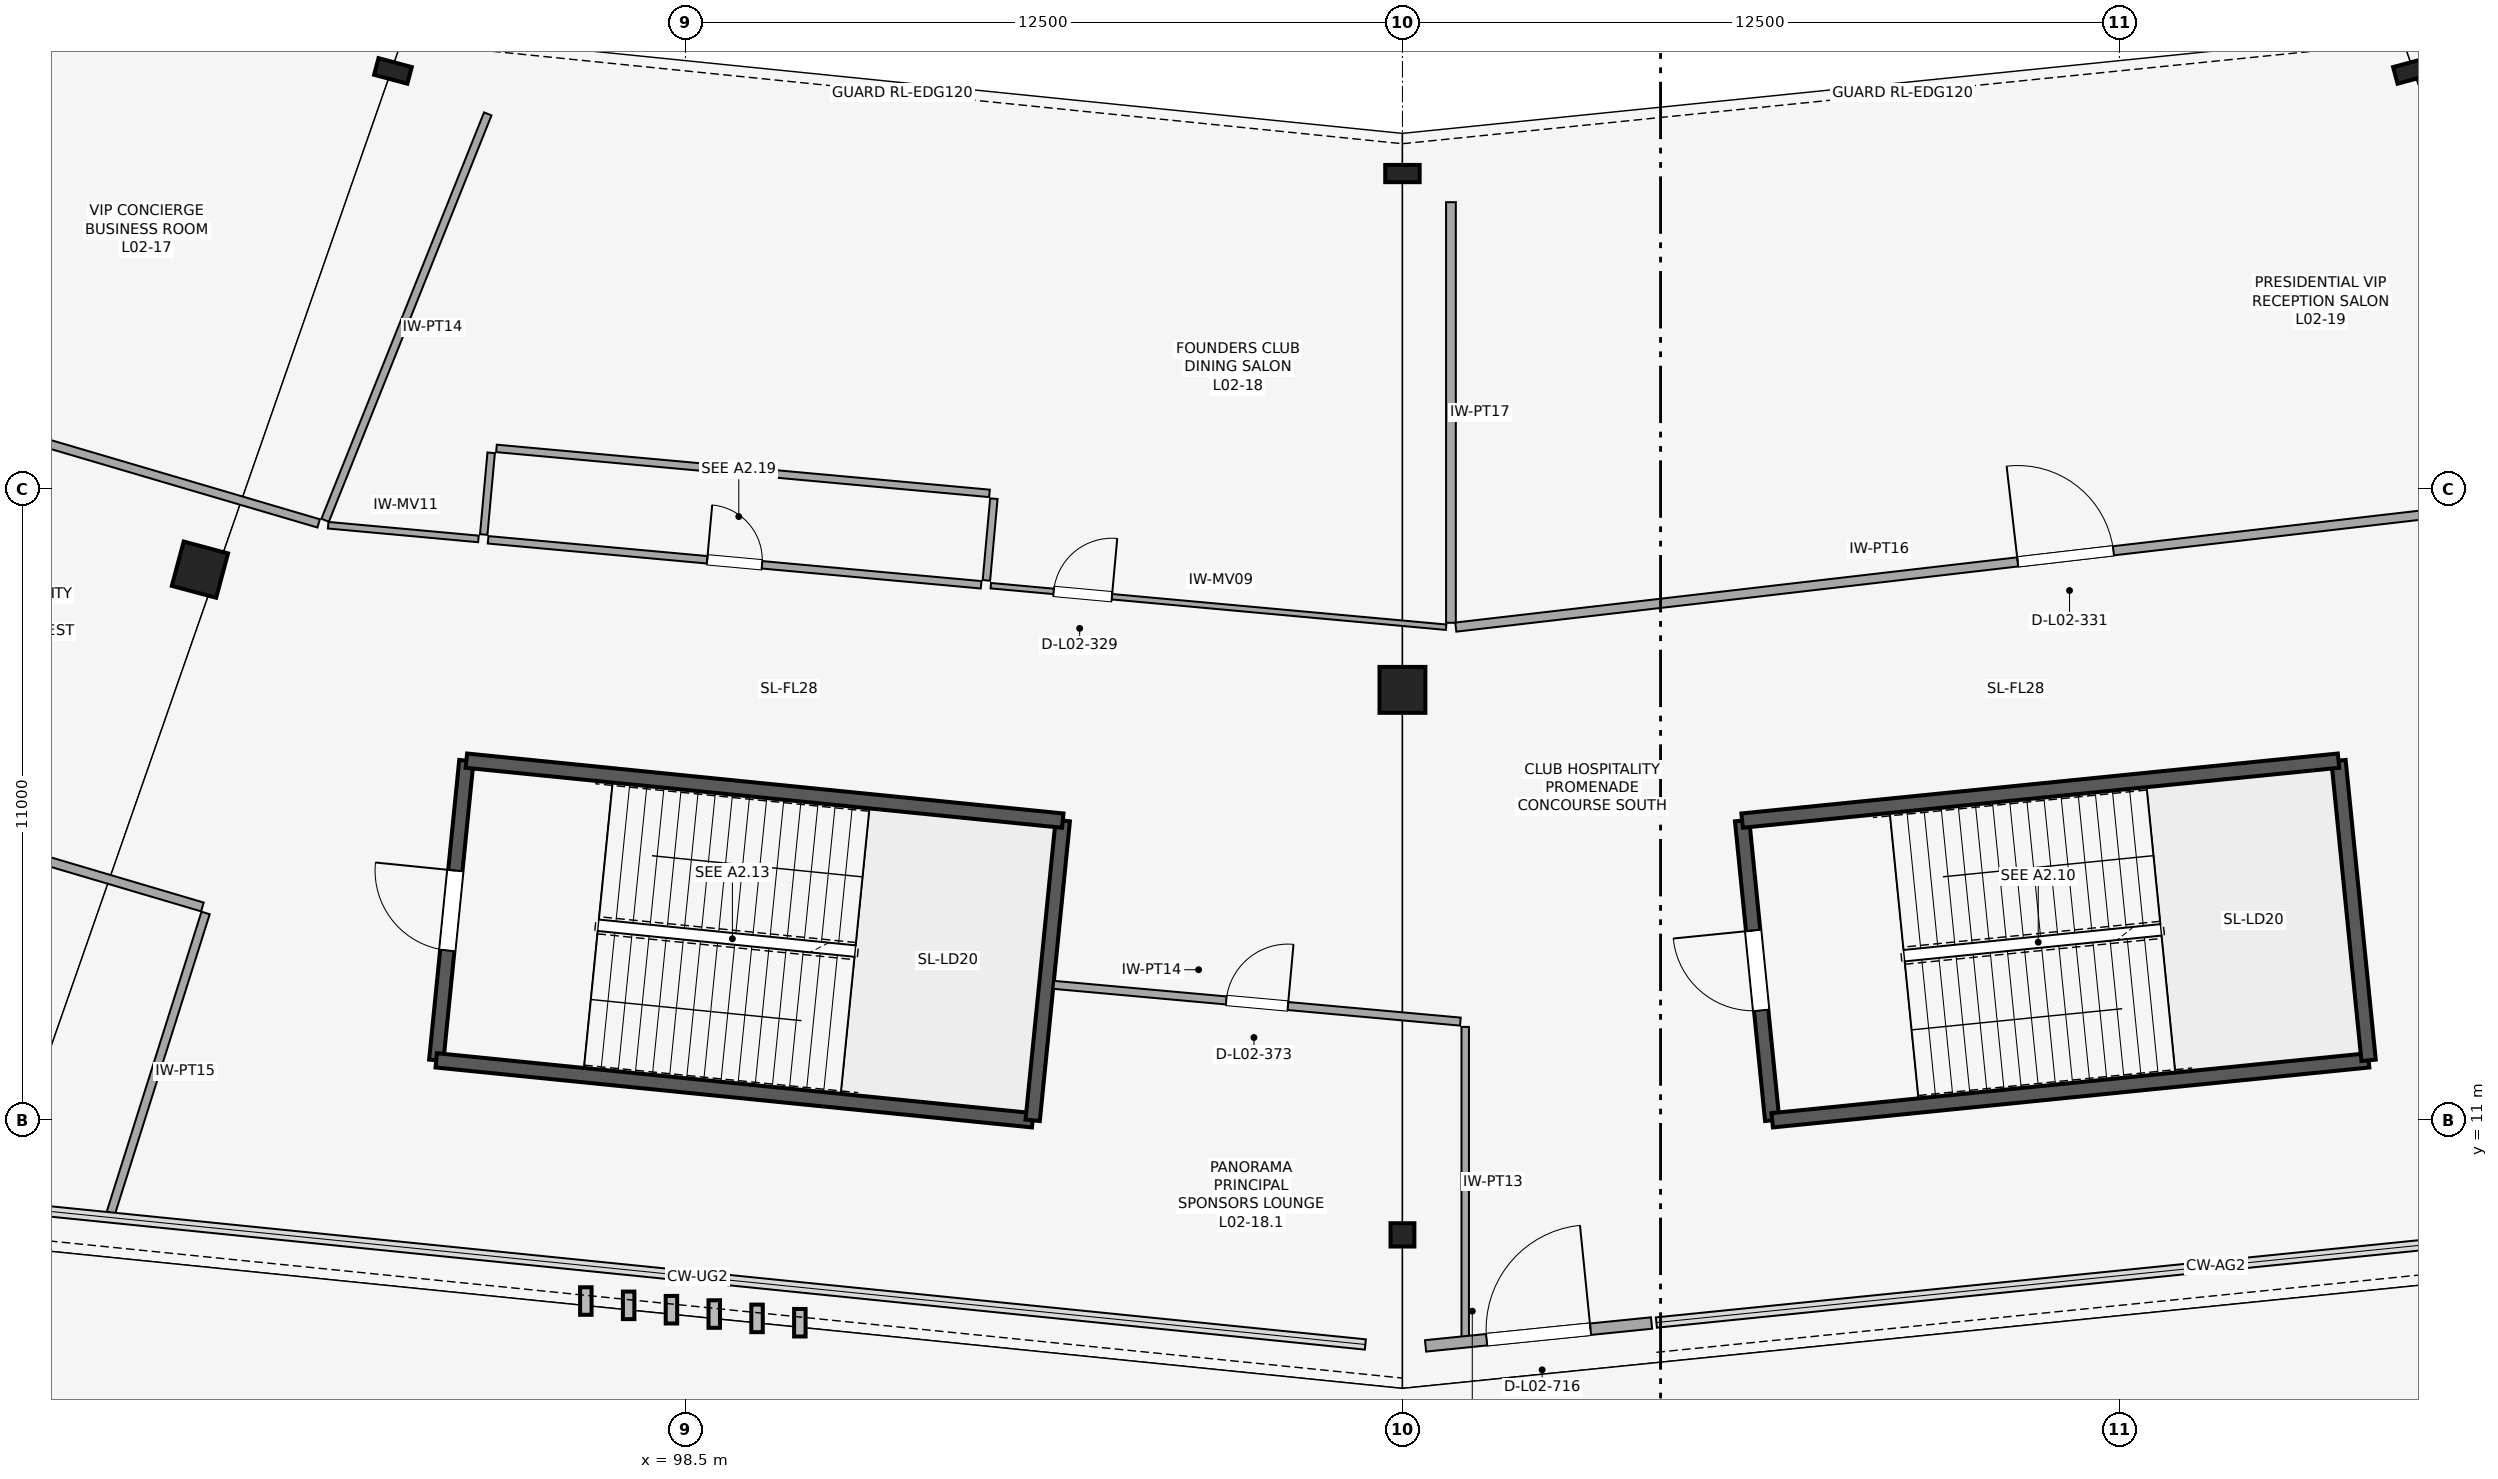
"""IFC4 building model, lengths in metres.
Left out: names, types, materials, properties, quantities, classifications, styles, units other than length and angle.
Written with IfcOpenShell. Run it as: python <this file> out.ifc"""

import sys

from ifc_helpers import new_model, si_unit, direction, frame, frame_2d, origin, origin_2d, place, context, subcontext, project, spatial, rectangle, i_section, extrude, element, fill, save


model = new_model("IFC4")
c1 = context("Model", 3, precision=1e-05, world=origin(), true_north=direction((0.0, 1.0)))
c2 = subcontext(c1, "Body", "Model", "MODEL_VIEW")
j1 = project(units=[si_unit("LENGTHUNIT", "METRE"), si_unit("PLANEANGLEUNIT", "RADIAN")], contexts=[c1])
p1 = place(None, origin())
s1 = spatial("IfcSite", under=j1, at=p1, CompositionType="ELEMENT")
p2 = place(p1, origin())
s2 = spatial("IfcBuilding", under=s1, at=p2, CompositionType="ELEMENT")
p3 = place(p2, frame((0.0, 0.0, 10.6)))
s3 = spatial("IfcBuildingStorey", under=s2, at=p3, CompositionType="ELEMENT", Elevation=10.6)
for number, where, z_axis, x_axis in (
    (1, (93.4, 29.289, 0.0), (0.0, 0.0, 1.0), (-0.259, -0.966, 0.0)),
    (2, (111.0, 27.5, 0.0), (0.0, 0.0, 1.0), (0.0, -1.0, 0.0)),
    (3, (128.6, 29.289, 0.0), (0.0, 0.0, 1.0), (0.259, -0.966, 0.0)),
):
    element("IfcColumn", number, at=place(p3, frame(where, z_axis=z_axis, x_axis=x_axis)), inside=s3, PredefinedType="COLUMN", context=c2, shape_type="SweptSolid", body=[
        extrude(i_section(OverallWidth=0.3, OverallDepth=0.6, WebThickness=0.015, FlangeThickness=0.03, FilletRadius=0.027, at=origin_2d()), origin(), (0.0, 0.0, 1.0), 5.0),
    ])
p4 = place(p3, frame((90.036, 20.596, 0.0), z_axis=(0.0, 0.0, 1.0), x_axis=(-0.258819045103, -0.965925826289, 0.0)))
e4 = element("IfcColumn", 4, at=p4, inside=s3, PredefinedType="COLUMN", context=c2, shape_type="SweptSolid", body=[
    extrude(rectangle(XDim=0.8, YDim=0.8, at=origin_2d()), origin(), (0.0, 0.0, 1.0), 5.0),
])
p5 = place(p3, frame((111.0, 18.5, -0.28), z_axis=(0.0, 0.0, 1.0), x_axis=(0.0, -1.0, 0.0)))
e5 = element("IfcColumn", 5, at=p5, inside=s3, PredefinedType="COLUMN", context=c2, shape_type="SweptSolid", body=[
    extrude(rectangle(XDim=0.8, YDim=0.8, at=origin_2d()), origin(), (0.0, 0.0, 1.0), 5.28),
])
p6 = place(p3, frame((111.0, 9.0, -0.28), z_axis=(0.0, 0.0, 1.0), x_axis=(0.0, -1.0, 0.0)))
e6 = element("IfcColumn", 6, at=p6, inside=s3, PredefinedType="PILASTER", context=c2, shape_type="SweptSolid", body=[
    extrude(i_section(OverallWidth=0.406, OverallDepth=0.416, WebThickness=0.024, FlangeThickness=0.039, FilletRadius=0.015, at=origin_2d()), origin(), (0.0, 0.0, 1.0), 5.28),
])
p7 = place(p3, frame((116.921, 16.221, 0.0), z_axis=(0.0, 0.0, 1.0), x_axis=(0.100028593886, -0.994984562898, 0.0)))
e7 = element("IfcWall", 7, at=p7, inside=s3, PredefinedType="SHEAR", context=c2, shape_type="SweptSolid", body=[
    extrude(rectangle(XDim=5.25, YDim=0.25, at=frame_2d((2.625, 0.0))), origin(), (0.0, 0.0, 1.0), 4.72),
])
p8 = place(p7, frame((1.925, 0.0, 0.0)))
e8 = element("IfcOpeningElement", 8, at=p8, cuts=e7, PredefinedType="OPENING", context=c2, shape_type="SweptSolid", body=[
    extrude(rectangle(XDim=1.4, YDim=2.2, at=frame_2d((0.7, 1.1))), frame((0.0, 0.135, 0.0), z_axis=(0.0, -1.0, 0.0), x_axis=(1.0, 0.0, 0.0)), (0.0, 0.0, 1.0), 0.27),
])
p9 = place(p3, frame((117.447, 10.997, 0.0), z_axis=(0.0, 0.0, 1.0), x_axis=(0.994985938948, 0.100014905366, 0.0)))
e9 = element("IfcWall", 9, at=p9, inside=s3, PredefinedType="SHEAR", context=c2, shape_type="SweptSolid", body=[
    extrude(rectangle(XDim=10.45, YDim=0.25, at=frame_2d((5.225, 0.0))), origin(), (0.0, 0.0, 1.0), 4.72),
])
p10 = place(p3, frame((127.844, 12.042, 0.0), z_axis=(0.0, 0.0, 1.0), x_axis=(-0.100028593886, 0.994984562898, 0.0)))
e10 = element("IfcWall", 10, at=p10, inside=s3, PredefinedType="SHEAR", context=c2, shape_type="SweptSolid", body=[
    extrude(rectangle(XDim=5.25, YDim=0.25, at=frame_2d((2.625, 0.0))), origin(), (0.0, 0.0, 1.0), 4.72),
])
p11 = place(p3, frame((127.319, 17.266, 0.0), z_axis=(0.0, 0.0, 1.0), x_axis=(-0.994985938948, -0.100014905366, 0.0)))
e11 = element("IfcWall", 11, at=p11, inside=s3, PredefinedType="SHEAR", context=c2, shape_type="SweptSolid", body=[
    extrude(rectangle(XDim=10.45, YDim=0.25, at=frame_2d((5.225, 0.0))), origin(), (0.0, 0.0, 1.0), 4.72),
])
p12 = place(p3, frame((94.681, 17.266, 0.0), z_axis=(0.0, 0.0, 1.0), x_axis=(-0.10002396577, -0.994985028165, 0.0)))
e12 = element("IfcWall", 12, at=p12, inside=s3, PredefinedType="SHEAR", context=c2, shape_type="SweptSolid", body=[
    extrude(rectangle(XDim=5.25, YDim=0.25, at=frame_2d((2.625, 0.0))), origin(), (0.0, 0.0, 1.0), 4.72),
])
p13 = place(p12, frame((1.925, 0.0, 0.0)))
e13 = element("IfcOpeningElement", 13, at=p13, cuts=e12, PredefinedType="OPENING", context=c2, shape_type="SweptSolid", body=[
    extrude(rectangle(XDim=1.4, YDim=2.2, at=frame_2d((0.7, 1.1))), frame((0.0, 0.135, 0.0), z_axis=(0.0, -1.0, 0.0), x_axis=(1.0, 0.0, 0.0)), (0.0, 0.0, 1.0), 0.27),
])
p14 = place(p3, frame((94.156, 12.042, 0.0), z_axis=(0.0, 0.0, 1.0), x_axis=(0.994988263568, -0.09999177647, 0.0)))
e14 = element("IfcWall", 14, at=p14, inside=s3, PredefinedType="SHEAR", context=c2, shape_type="SweptSolid", body=[
    extrude(rectangle(XDim=10.45, YDim=0.25, at=frame_2d((5.225, 0.0))), origin(), (0.0, 0.0, 1.0), 4.72),
])
p15 = place(p3, frame((104.553, 10.997, 0.0), z_axis=(0.0, 0.0, 1.0), x_axis=(0.099982555566, 0.994989190184, 0.0)))
e15 = element("IfcWall", 15, at=p15, inside=s3, PredefinedType="SHEAR", context=c2, shape_type="SweptSolid", body=[
    extrude(rectangle(XDim=5.25, YDim=0.25, at=frame_2d((2.625, 0.0))), origin(), (0.0, 0.0, 1.0), 4.72),
])
p16 = place(p3, frame((105.078, 16.221, 0.0), z_axis=(0.0, 0.0, 1.0), x_axis=(-0.994985705245, 0.100017230303, 0.0)))
e16 = element("IfcWall", 16, at=p16, inside=s3, PredefinedType="SHEAR", context=c2, shape_type="SweptSolid", body=[
    extrude(rectangle(XDim=10.45, YDim=0.25, at=frame_2d((5.225, 0.0))), origin(), (0.0, 0.0, 1.0), 4.72),
])
p17 = place(p3, frame((72.279, 27.237, 0.0), z_axis=(0.0, 0.0, 1.0), x_axis=(0.959319404283, -0.282323007504, 0.0)))
e17 = element("IfcWall", 17, at=p17, inside=s3, PredefinedType="PARTITIONING", context=c2, shape_type="SweptSolid", body=[
    extrude(rectangle(XDim=20.668, YDim=0.15, at=frame_2d((10.334, 0.0))), origin(), (0.0, 0.0, 1.0), 3.47),
])
p18 = place(p17, frame((9.494, 0.0, 0.0)))
e18 = element("IfcOpeningElement", 18, at=p18, cuts=e17, PredefinedType="OPENING", context=c2, shape_type="SweptSolid", body=[
    extrude(rectangle(XDim=1.68, YDim=2.1, at=frame_2d((0.84, 1.05))), frame((0.0, 0.085, 0.0), z_axis=(0.0, -1.0, 0.0), x_axis=(1.0, 0.0, 0.0)), (0.0, 0.0, 1.0), 0.17),
])
p19 = place(p3, frame((95.054, 28.54, 0.0), z_axis=(0.0, 0.0, 1.0), x_axis=(-0.37161687276, -0.928386180358, 0.0)))
e19 = element("IfcWall", 19, at=p19, inside=s3, PredefinedType="PARTITIONING", context=c2, shape_type="SweptSolid", body=[
    extrude(rectangle(XDim=7.629, YDim=0.14, at=frame_2d((3.815, 0.0))), origin(), (0.0, 0.0, 1.0), 3.47),
])
p20 = place(p3, frame((95.06, 21.116, 0.0), z_axis=(0.0, 0.0, 1.0), x_axis=(0.995863239806, -0.090864776475, 0.0)))
e20 = element("IfcWall", 20, at=p20, inside=s3, PredefinedType="PARTITIONING", context=c2, shape_type="SweptSolid", body=[
    extrude(rectangle(XDim=8.63, YDim=0.13, at=frame_2d((4.315, 0.0))), origin(), (0.0, 0.0, 1.0), 3.47),
])
p21 = place(p20, frame((3.835, 0.0, 0.0)))
e21 = element("IfcOpeningElement", 21, at=p21, cuts=e20, PredefinedType="OPENING", context=c2, shape_type="SweptSolid", body=[
    extrude(rectangle(XDim=0.96, YDim=2.24, at=frame_2d((0.48, 1.12))), frame((0.0, 0.075, 0.0), z_axis=(0.0, -1.0, 0.0), x_axis=(1.0, 0.0, 0.0)), (0.0, 0.0, 1.0), 0.15),
])
p22 = place(p3, frame((95.206, 22.709, 0.0), z_axis=(0.0, 0.0, 1.0), x_axis=(0.995865565838, -0.090839279925, 0.0)))
e22 = element("IfcWall", 22, at=p22, inside=s3, PredefinedType="PARTITIONING", context=c2, shape_type="SweptSolid", body=[
    extrude(rectangle(XDim=8.63, YDim=0.13, at=frame_2d((4.315, 0.0))), origin(), (0.0, 0.0, 1.0), 3.47),
])
p23 = place(p3, frame((94.983, 21.208, 0.0), z_axis=(0.0, 0.0, 1.0), x_axis=(0.090997539094, 0.995851117326, 0.0)))
e23 = element("IfcWall", 23, at=p23, inside=s3, PredefinedType="PARTITIONING", context=c2, shape_type="SweptSolid", body=[
    extrude(rectangle(XDim=1.43, YDim=0.13, at=frame_2d((0.715, 0.0))), origin(), (0.0, 0.0, 1.0), 3.47),
])
p24 = place(p3, frame((103.747, 20.408, 0.0), z_axis=(0.0, 0.0, 1.0), x_axis=(0.090812781408, 0.995867982583, 0.0)))
e24 = element("IfcWall", 24, at=p24, inside=s3, PredefinedType="PARTITIONING", context=c2, shape_type="SweptSolid", body=[
    extrude(rectangle(XDim=1.43, YDim=0.13, at=frame_2d((0.715, 0.0))), origin(), (0.0, 0.0, 1.0), 3.47),
])
p25 = place(p3, frame((92.272, 21.37, 0.0), z_axis=(0.0, 0.0, 1.0), x_axis=(0.995861950951, -0.090878901005, 0.0)))
e25 = element("IfcWall", 25, at=p25, inside=s3, PredefinedType="MOVABLE", context=c2, shape_type="SweptSolid", body=[
    extrude(rectangle(XDim=2.63, YDim=0.115, at=frame_2d((1.315, 0.0))), origin(), (0.0, 0.0, 1.0), 3.47),
])
p26 = place(p3, frame((103.824, 20.316, 0.0), z_axis=(0.0, 0.0, 1.0), x_axis=(0.995864534593, -0.090850584695, 0.0)))
e26 = element("IfcWall", 26, at=p26, inside=s3, PredefinedType="MOVABLE", context=c2, shape_type="SweptSolid", body=[
    extrude(rectangle(XDim=7.97, YDim=0.095, at=frame_2d((3.985, 0.0))), origin(), (0.0, 0.0, 1.0), 3.47),
])
p27 = place(p26, frame((1.1, 0.0, 0.0)))
e27 = element("IfcOpeningElement", 27, at=p27, cuts=e26, PredefinedType="OPENING", context=c2, shape_type="SweptSolid", body=[
    extrude(rectangle(XDim=1.02, YDim=2.1, at=frame_2d((0.51, 1.05))), frame((0.0, 0.057, 0.0), z_axis=(0.0, -1.0, 0.0), x_axis=(1.0, 0.0, 0.0)), (0.0, 0.0, 1.0), 0.115),
])
p28 = place(p3, frame((111.846, 27.001, 0.0), z_axis=(0.0, 0.0, 1.0), x_axis=(0.0, -1.0, 0.0)))
e28 = element("IfcWall", 28, at=p28, inside=s3, PredefinedType="PARTITIONING", context=c2, shape_type="SweptSolid", body=[
    extrude(rectangle(XDim=7.332, YDim=0.17, at=frame_2d((3.666, 0.0))), origin(), (0.0, 0.0, 1.0), 3.47),
])
p29 = place(p3, frame((111.93, 19.594, 0.0), z_axis=(0.0, 0.0, 1.0), x_axis=(0.993336503718, 0.115250120956, 0.0)))
e29 = element("IfcWall", 29, at=p29, inside=s3, PredefinedType="PARTITIONING", context=c2, shape_type="SweptSolid", body=[
    extrude(rectangle(XDim=21.404, YDim=0.16, at=frame_2d((10.702, 0.0))), origin(), (0.0, 0.0, 1.0), 3.47),
])
p30 = place(p29, frame((9.862, 0.0, 0.0)))
e30 = element("IfcOpeningElement", 30, at=p30, cuts=e29, PredefinedType="OPENING", context=c2, shape_type="SweptSolid", body=[
    extrude(rectangle(XDim=1.68, YDim=2.38, at=frame_2d((0.84, 1.19))), frame((0.0, 0.09, 0.0), z_axis=(0.0, -1.0, 0.0), x_axis=(1.0, 0.0, 0.0)), (0.0, 0.0, 1.0), 0.18),
])
p31 = place(p3, frame((82.699, 16.898, 0.0), z_axis=(0.0, 0.0, 1.0), x_axis=(0.958974593553, -0.283492026201, 0.0)))
e31 = element("IfcWall", 31, at=p31, inside=s3, PredefinedType="PARTITIONING", context=c2, shape_type="SweptSolid", body=[
    extrude(rectangle(XDim=7.696, YDim=0.16, at=frame_2d((3.848, 0.0))), origin(), (0.0, 0.0, 1.0), 3.47),
])
p32 = place(p31, frame((3.308, 0.0, 0.0)))
e32 = element("IfcOpeningElement", 32, at=p32, cuts=e31, PredefinedType="OPENING", context=c2, shape_type="SweptSolid", body=[
    extrude(rectangle(XDim=1.08, YDim=2.1, at=frame_2d((0.54, 1.05))), frame((0.0, 0.09, 0.0), z_axis=(0.0, -1.0, 0.0), x_axis=(1.0, 0.0, 0.0)), (0.0, 0.0, 1.0), 0.18),
])
p33 = place(p3, frame((90.135, 14.611, 0.0), z_axis=(0.0, 0.0, 1.0), x_axis=(-0.301259297359, -0.953542256932, 0.0)))
e33 = element("IfcWall", 33, at=p33, inside=s3, PredefinedType="PARTITIONING", context=c2, shape_type="SweptSolid", body=[
    extrude(rectangle(XDim=5.48, YDim=0.15, at=frame_2d((2.74, 0.0))), origin(), (0.0, 0.0, 1.0), 3.47),
])
p34 = place(p3, frame((104.921, 13.358, 0.0), z_axis=(0.0, 0.0, 1.0), x_axis=(0.995940866338, -0.090009948105, 0.0)))
e34 = element("IfcWall", 34, at=p34, inside=s3, PredefinedType="PARTITIONING", context=c2, shape_type="SweptSolid", body=[
    extrude(rectangle(XDim=7.117, YDim=0.14, at=frame_2d((3.559, 0.0))), origin(), (0.0, 0.0, 1.0), 3.47),
])
p35 = place(p34, frame((3.019, 0.0, 0.0)))
e35 = element("IfcOpeningElement", 35, at=p35, cuts=e34, PredefinedType="OPENING", context=c2, shape_type="SweptSolid", body=[
    extrude(rectangle(XDim=1.08, YDim=2.38, at=frame_2d((0.54, 1.19))), frame((0.0, 0.08, 0.0), z_axis=(0.0, -1.0, 0.0), x_axis=(1.0, 0.0, 0.0)), (0.0, 0.0, 1.0), 0.16),
])
p36 = place(p3, frame((112.094, 12.625, 0.0), z_axis=(0.0, 0.0, 1.0), x_axis=(0.0, -1.0, 0.0)))
e36 = element("IfcWall", 36, at=p36, inside=s3, PredefinedType="PARTITIONING", context=c2, shape_type="SweptSolid", body=[
    extrude(rectangle(XDim=5.405, YDim=0.13, at=frame_2d((2.703, 0.0))), origin(), (0.0, 0.0, 1.0), 3.47),
])
p37 = place(p3, frame((111.403, 7.065, 0.0), z_axis=(0.0, 0.0, 1.0), x_axis=(0.994924851804, 0.100620769545, 0.0)))
e37 = element("IfcWall", 37, at=p37, inside=s3, PredefinedType="PARTITIONING", context=c2, shape_type="SweptSolid", body=[
    extrude(rectangle(XDim=3.96, YDim=0.2, at=frame_2d((1.98, 0.0))), origin(), (0.0, 0.0, 1.0), 3.47),
])
p38 = place(p37, frame((1.07, 0.0, 0.0)))
e38 = element("IfcOpeningElement", 38, at=p38, cuts=e37, PredefinedType="OPENING", context=c2, shape_type="SweptSolid", body=[
    extrude(rectangle(XDim=1.82, YDim=2.38, at=frame_2d((0.91, 1.19))), frame((0.0, 0.11, 0.0), z_axis=(0.0, -1.0, 0.0), x_axis=(1.0, 0.0, 0.0)), (0.0, 0.0, 1.0), 0.22),
])
p39 = place(p8, frame((1.4, 0.0, 0.0), z_axis=(0.0, 0.0, 1.0), x_axis=(-1.0, 0.0, 0.0)))
e39 = element("IfcDoor", 39, at=p39, inside=s3, OperationType="SINGLE_SWING_RIGHT", PredefinedType="DOOR", context=c2, shape_type="SweptSolid", body=[
    extrude(rectangle(XDim=1.4, YDim=2.2, at=frame_2d((0.7, 1.1))), frame((0.0, 0.025, 0.0), z_axis=(0.0, -1.0, 0.0), x_axis=(1.0, 0.0, 0.0)), (0.0, 0.0, 1.0), 0.05),
])
fill(e8, e39)
p40 = place(p13, frame((1.4, 0.0, 0.0), z_axis=(0.0, 0.0, 1.0), x_axis=(-1.0, 0.0, 0.0)))
e40 = element("IfcDoor", 40, at=p40, inside=s3, OperationType="SINGLE_SWING_RIGHT", PredefinedType="DOOR", context=c2, shape_type="SweptSolid", body=[
    extrude(rectangle(XDim=1.4, YDim=2.2, at=frame_2d((0.7, 1.1))), frame((0.0, 0.025, 0.0), z_axis=(0.0, -1.0, 0.0), x_axis=(1.0, 0.0, 0.0)), (0.0, 0.0, 1.0), 0.05),
])
fill(e13, e40)
p41 = place(p21, origin())
e41 = element("IfcDoor", 41, at=p41, inside=s3, OperationType="SINGLE_SWING_LEFT", PredefinedType="DOOR", context=c2, shape_type="SweptSolid", body=[
    extrude(rectangle(XDim=0.96, YDim=2.24, at=frame_2d((0.48, 1.12))), frame((0.0, 0.025, 0.0), z_axis=(0.0, -1.0, 0.0), x_axis=(1.0, 0.0, 0.0)), (0.0, 0.0, 1.0), 0.05),
])
fill(e21, e41)
p42 = place(p27, origin())
e42 = element("IfcDoor", 42, at=p42, inside=s3, OperationType="SINGLE_SWING_RIGHT", PredefinedType="DOOR", context=c2, shape_type="SweptSolid", body=[
    extrude(rectangle(XDim=1.02, YDim=2.1, at=frame_2d((0.51, 1.05))), frame((0.0, 0.025, 0.0), z_axis=(0.0, -1.0, 0.0), x_axis=(1.0, 0.0, 0.0)), (0.0, 0.0, 1.0), 0.05),
])
fill(e27, e42)
p43 = place(p30, origin())
e43 = element("IfcDoor", 43, at=p43, inside=s3, OperationType="SINGLE_SWING_LEFT", PredefinedType="DOOR", context=c2, shape_type="SweptSolid", body=[
    extrude(rectangle(XDim=1.68, YDim=2.38, at=frame_2d((0.84, 1.19))), frame((0.0, 0.025, 0.0), z_axis=(0.0, -1.0, 0.0), x_axis=(1.0, 0.0, 0.0)), (0.0, 0.0, 1.0), 0.05),
])
fill(e30, e43)
p44 = place(p35, origin())
e44 = element("IfcDoor", 44, at=p44, inside=s3, OperationType="SINGLE_SWING_RIGHT", PredefinedType="DOOR", context=c2, shape_type="SweptSolid", body=[
    extrude(rectangle(XDim=1.08, YDim=2.38, at=frame_2d((0.54, 1.19))), frame((0.0, 0.025, 0.0), z_axis=(0.0, -1.0, 0.0), x_axis=(1.0, 0.0, 0.0)), (0.0, 0.0, 1.0), 0.05),
])
fill(e35, e44)
p45 = place(p38, origin())
e45 = element("IfcDoor", 45, at=p45, inside=s3, OperationType="SINGLE_SWING_RIGHT", PredefinedType="DOOR", context=c2, shape_type="SweptSolid", body=[
    extrude(rectangle(XDim=1.82, YDim=2.38, at=frame_2d((0.91, 1.19))), frame((0.0, 0.025, 0.0), z_axis=(0.0, -1.0, 0.0), x_axis=(1.0, 0.0, 0.0)), (0.0, 0.0, 1.0), 0.05),
])
fill(e38, e45)
save(model, sys.argv[1])
